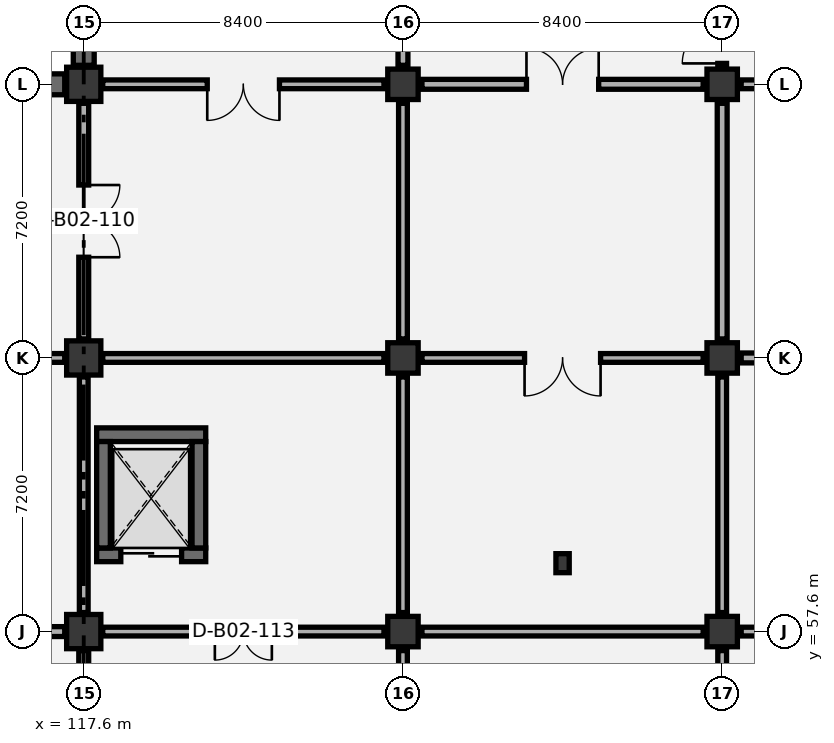
"""IFC4 building model, lengths in metres.
Left out: names, types, materials, properties, quantities, classifications, styles, units other than length and angle.
Written with IfcOpenShell. Run it as: python <this file> out.ifc"""

import sys

from ifc_helpers import new_model, si_unit, direction, frame, frame_2d, origin, origin_2d, place, context, subcontext, project, spatial, rectangle, extrude, element, fill, save


model = new_model("IFC4")
c1 = context("Model", 3, precision=1e-05, world=origin(), true_north=direction((0.0, 1.0)))
c2 = subcontext(c1, "Body", "Model", "MODEL_VIEW")
j1 = project(units=[si_unit("LENGTHUNIT", "METRE"), si_unit("PLANEANGLEUNIT", "RADIAN")], contexts=[c1])
p1 = place(None, origin())
s1 = spatial("IfcSite", under=j1, at=p1, CompositionType="ELEMENT")
p2 = place(p1, origin())
s2 = spatial("IfcBuilding", under=s1, at=p2, CompositionType="ELEMENT")
p3 = place(p2, frame((0.0, 0.0, -9.6)))
s3 = spatial("IfcBuildingStorey", under=s2, at=p3, CompositionType="ELEMENT", Elevation=-9.6)
for number, where, z_axis, x_axis in (
    (1, (117.6, 57.6, 0.0), (0.0, 0.0, 1.0), (1.0, 0.0, 0.0)),
    (2, (117.6, 64.8, 0.0), (0.0, 0.0, 1.0), (1.0, 0.0, 0.0)),
    (3, (117.6, 72.0, 0.0), (0.0, 0.0, 1.0), (1.0, 0.0, 0.0)),
):
    element("IfcColumn", number, at=place(p3, frame(where, z_axis=z_axis, x_axis=x_axis)), inside=s3, PredefinedType="COLUMN", context=c2, shape_type="SweptSolid", body=[
        extrude(rectangle(XDim=0.9, YDim=0.9, at=origin_2d()), origin(), (0.0, 0.0, 1.0), 4.8),
    ])
for number, where, z_axis, x_axis in (
    (4, (126.0, 57.6, 0.0), (0.0, 0.0, 1.0), (1.0, 0.0, 0.0)),
    (5, (126.0, 64.8, 0.0), (0.0, 0.0, 1.0), (1.0, 0.0, 0.0)),
    (6, (126.0, 72.0, 0.0), (0.0, 0.0, 1.0), (1.0, 0.0, 0.0)),
    (7, (134.4, 57.6, 0.0), (0.0, 0.0, 1.0), (1.0, 0.0, 0.0)),
    (8, (134.4, 64.8, 0.0), (0.0, 0.0, 1.0), (1.0, 0.0, 0.0)),
    (9, (134.4, 72.0, 0.0), (0.0, 0.0, 1.0), (1.0, 0.0, 0.0)),
):
    element("IfcColumn", number, at=place(p3, frame(where, z_axis=z_axis, x_axis=x_axis)), inside=s3, PredefinedType="COLUMN", context=c2, shape_type="SweptSolid", body=[
        extrude(rectangle(XDim=0.8, YDim=0.8, at=origin_2d()), origin(), (0.0, 0.0, 1.0), 4.8),
    ])
p4 = place(p3, frame((130.2, 59.4, 0.0), z_axis=(0.0, 0.0, 1.0), x_axis=(1.0, 0.0, 0.0)))
e10 = element("IfcColumn", 10, at=p4, inside=s3, PredefinedType="PILASTER", context=c2, shape_type="SweptSolid", body=[
    extrude(rectangle(XDim=0.35, YDim=0.5, at=origin_2d()), origin(), (0.0, 0.0, 1.0), 4.8),
])
p5 = place(p3, frame((109.7, 72.0, 0.0), z_axis=(0.0, 0.0, 1.0), x_axis=(1.0, 0.0, 0.0)))
e11 = element("IfcWall", 11, at=p5, inside=s3, PredefinedType="USERDEFINED", context=c2, shape_type="SweptSolid", body=[
    extrude(rectangle(XDim=7.4, YDim=0.55, at=frame_2d((3.7, 0.0))), origin(), (0.0, 0.0, 1.0), 4.4),
])
p6 = place(p3, frame((117.6, 72.5, 0.0), z_axis=(0.0, 0.0, 1.0), x_axis=(0.0, 1.0, 0.0)))
e12 = element("IfcWall", 12, at=p6, inside=s3, PredefinedType="USERDEFINED", context=c2, shape_type="SweptSolid", body=[
    extrude(rectangle(XDim=6.2, YDim=0.55, at=frame_2d((3.1, 0.0))), origin(), (0.0, 0.0, 1.0), 4.4),
])
p7 = place(p3, frame((117.94, 62.78, -0.75), z_axis=(0.0, 0.0, 1.0), x_axis=(1.0, 0.0, 0.0)))
e13 = element("IfcWall", 13, at=p7, inside=s3, PredefinedType="SHEAR", context=c2, shape_type="SweptSolid", body=[
    extrude(rectangle(XDim=2.87, YDim=0.36, at=frame_2d((1.435, 0.0))), origin(), (0.0, 0.0, 1.0), 5.15),
])
p8 = place(p3, frame((117.94, 59.62, -0.75), z_axis=(0.0, 0.0, 1.0), x_axis=(1.0, 0.0, 0.0)))
e14 = element("IfcWall", 14, at=p8, inside=s3, PredefinedType="SHEAR", context=c2, shape_type="SweptSolid", body=[
    extrude(rectangle(XDim=2.87, YDim=0.36, at=frame_2d((1.435, 0.0))), origin(), (0.0, 0.0, 1.0), 5.15),
])
p9 = place(p8, frame((0.635, 0.0, 0.75)))
e15 = element("IfcOpeningElement", 15, at=p9, cuts=e14, PredefinedType="OPENING", context=c2, shape_type="SweptSolid", body=[
    extrude(rectangle(XDim=1.6, YDim=2.25, at=frame_2d((0.8, 1.125))), frame((0.0, 0.19, 0.0), z_axis=(0.0, -1.0, 0.0), x_axis=(1.0, 0.0, 0.0)), (0.0, 0.0, 1.0), 0.38),
])
for number, where, z_axis, x_axis in (
    (16, (118.12, 59.8, -0.75), (0.0, 0.0, 1.0), (0.0, 1.0, 0.0)),
    (17, (120.63, 59.8, -0.75), (0.0, 0.0, 1.0), (0.0, 1.0, 0.0)),
):
    element("IfcWall", number, at=place(p3, frame(where, z_axis=z_axis, x_axis=x_axis)), inside=s3, PredefinedType="SHEAR", context=c2, shape_type="SweptSolid", body=[
        extrude(rectangle(XDim=2.8, YDim=0.36, at=frame_2d((1.4, 0.0))), origin(), (0.0, 0.0, 1.0), 5.15),
    ])
p10 = place(p3, frame((117.6, 50.9, 0.0), z_axis=(0.0, 0.0, 1.0), x_axis=(0.0, 1.0, 0.0)))
e18 = element("IfcWall", 18, at=p10, inside=s3, PredefinedType="PARTITIONING", context=c2, shape_type="SweptSolid", body=[
    extrude(rectangle(XDim=6.2, YDim=0.26, at=frame_2d((3.1, 0.0))), origin(), (0.0, 0.0, 1.0), 3.595),
])
p11 = place(p3, frame((109.7, 57.6, 0.0), z_axis=(0.0, 0.0, 1.0), x_axis=(1.0, 0.0, 0.0)))
e19 = element("IfcWall", 19, at=p11, inside=s3, PredefinedType="PARTITIONING", context=c2, shape_type="SweptSolid", body=[
    extrude(rectangle(XDim=7.4, YDim=0.26, at=frame_2d((3.7, 0.0))), origin(), (0.0, 0.0, 1.0), 3.495),
])
p12 = place(p11, frame((2.7, 0.0, 0.0)))
e20 = element("IfcOpeningElement", 20, at=p12, cuts=e19, PredefinedType="OPENING", context=c2, shape_type="SweptSolid", body=[
    extrude(rectangle(XDim=2.0, YDim=2.35, at=frame_2d((1.0, 1.175))), frame((0.0, 0.14, 0.0), z_axis=(0.0, -1.0, 0.0), x_axis=(1.0, 0.0, 0.0)), (0.0, 0.0, 1.0), 0.28),
])
p13 = place(p3, frame((117.6, 58.1, 0.0), z_axis=(0.0, 0.0, 1.0), x_axis=(0.0, 1.0, 0.0)))
e21 = element("IfcWall", 21, at=p13, inside=s3, PredefinedType="PARTITIONING", context=c2, shape_type="SweptSolid", body=[
    extrude(rectangle(XDim=6.2, YDim=0.23, at=frame_2d((3.1, 0.0))), origin(), (0.0, 0.0, 1.0), 3.595),
])
p14 = place(p3, frame((109.7, 64.8, 0.0), z_axis=(0.0, 0.0, 1.0), x_axis=(1.0, 0.0, 0.0)))
e22 = element("IfcWall", 22, at=p14, inside=s3, PredefinedType="PARTITIONING", context=c2, shape_type="SweptSolid", body=[
    extrude(rectangle(XDim=7.4, YDim=0.23, at=frame_2d((3.7, 0.0))), origin(), (0.0, 0.0, 1.0), 3.495),
])
p15 = place(p3, frame((117.6, 65.3, 0.0), z_axis=(0.0, 0.0, 1.0), x_axis=(0.0, 1.0, 0.0)))
e23 = element("IfcWall", 23, at=p15, inside=s3, PredefinedType="PARTITIONING", context=c2, shape_type="SweptSolid", body=[
    extrude(rectangle(XDim=6.2, YDim=0.26, at=frame_2d((3.1, 0.0))), origin(), (0.0, 0.0, 1.0), 3.595),
])
p16 = place(p15, frame((2.15, 0.0, 0.0)))
e24 = element("IfcOpeningElement", 24, at=p16, cuts=e23, PredefinedType="OPENING", context=c2, shape_type="SweptSolid", body=[
    extrude(rectangle(XDim=1.9, YDim=2.3, at=frame_2d((0.95, 1.15))), frame((0.0, 0.14, 0.0), z_axis=(0.0, -1.0, 0.0), x_axis=(1.0, 0.0, 0.0)), (0.0, 0.0, 1.0), 0.28),
])
p17 = place(p3, frame((126.0, 50.9, 0.0), z_axis=(0.0, 0.0, 1.0), x_axis=(0.0, 1.0, 0.0)))
e25 = element("IfcWall", 25, at=p17, inside=s3, PredefinedType="PARTITIONING", context=c2, shape_type="SweptSolid", body=[
    extrude(rectangle(XDim=6.2, YDim=0.23, at=frame_2d((3.1, 0.0))), origin(), (0.0, 0.0, 1.0), 3.595),
])
p18 = place(p17, frame((0.05, 0.0, 0.0)))
e26 = element("IfcOpeningElement", 26, at=p18, cuts=e25, PredefinedType="OPENING", context=c2, shape_type="SweptSolid", body=[
    extrude(rectangle(XDim=1.05, YDim=2.15, at=frame_2d((0.525, 1.075))), frame((0.0, 0.125, 0.0), z_axis=(0.0, -1.0, 0.0), x_axis=(1.0, 0.0, 0.0)), (0.0, 0.0, 1.0), 0.25),
])
p19 = place(p3, frame((118.1, 57.6, 0.0), z_axis=(0.0, 0.0, 1.0), x_axis=(1.0, 0.0, 0.0)))
e27 = element("IfcWall", 27, at=p19, inside=s3, PredefinedType="PARTITIONING", context=c2, shape_type="SweptSolid", body=[
    extrude(rectangle(XDim=7.4, YDim=0.23, at=frame_2d((3.7, 0.0))), origin(), (0.0, 0.0, 1.0), 3.495),
])
p20 = place(p19, frame((2.95, 0.0, 0.0)))
e28 = element("IfcOpeningElement", 28, at=p20, cuts=e27, PredefinedType="OPENING", context=c2, shape_type="SweptSolid", body=[
    extrude(rectangle(XDim=1.5, YDim=2.15, at=frame_2d((0.75, 1.075))), frame((0.0, 0.125, 0.0), z_axis=(0.0, -1.0, 0.0), x_axis=(1.0, 0.0, 0.0)), (0.0, 0.0, 1.0), 0.25),
])
p21 = place(p3, frame((126.0, 58.1, 0.0), z_axis=(0.0, 0.0, 1.0), x_axis=(0.0, 1.0, 0.0)))
e29 = element("IfcWall", 29, at=p21, inside=s3, PredefinedType="PARTITIONING", context=c2, shape_type="SweptSolid", body=[
    extrude(rectangle(XDim=6.2, YDim=0.23, at=frame_2d((3.1, 0.0))), origin(), (0.0, 0.0, 1.0), 3.595),
])
p22 = place(p3, frame((118.1, 64.8, 0.0), z_axis=(0.0, 0.0, 1.0), x_axis=(1.0, 0.0, 0.0)))
e30 = element("IfcWall", 30, at=p22, inside=s3, PredefinedType="PARTITIONING", context=c2, shape_type="SweptSolid", body=[
    extrude(rectangle(XDim=7.4, YDim=0.23, at=frame_2d((3.7, 0.0))), origin(), (0.0, 0.0, 1.0), 3.495),
])
p23 = place(p3, frame((126.0, 65.3, 0.0), z_axis=(0.0, 0.0, 1.0), x_axis=(0.0, 1.0, 0.0)))
e31 = element("IfcWall", 31, at=p23, inside=s3, PredefinedType="PARTITIONING", context=c2, shape_type="SweptSolid", body=[
    extrude(rectangle(XDim=6.2, YDim=0.23, at=frame_2d((3.1, 0.0))), origin(), (0.0, 0.0, 1.0), 3.595),
])
p24 = place(p3, frame((118.1, 72.0, 0.0), z_axis=(0.0, 0.0, 1.0), x_axis=(1.0, 0.0, 0.0)))
e32 = element("IfcWall", 32, at=p24, inside=s3, PredefinedType="PARTITIONING", context=c2, shape_type="SweptSolid", body=[
    extrude(rectangle(XDim=7.4, YDim=0.23, at=frame_2d((3.7, 0.0))), origin(), (0.0, 0.0, 1.0), 3.495),
])
p25 = place(p24, frame((2.75, 0.0, 0.0)))
e33 = element("IfcOpeningElement", 33, at=p25, cuts=e32, PredefinedType="OPENING", context=c2, shape_type="SweptSolid", body=[
    extrude(rectangle(XDim=1.9, YDim=2.3, at=frame_2d((0.95, 1.15))), frame((0.0, 0.125, 0.0), z_axis=(0.0, -1.0, 0.0), x_axis=(1.0, 0.0, 0.0)), (0.0, 0.0, 1.0), 0.25),
])
p26 = place(p3, frame((126.0, 72.5, 0.0), z_axis=(0.0, 0.0, 1.0), x_axis=(0.0, 1.0, 0.0)))
e34 = element("IfcWall", 34, at=p26, inside=s3, PredefinedType="PARTITIONING", context=c2, shape_type="SweptSolid", body=[
    extrude(rectangle(XDim=6.2, YDim=0.26, at=frame_2d((3.1, 0.0))), origin(), (0.0, 0.0, 1.0), 3.595),
])
p27 = place(p26, frame((2.1, 0.0, 0.0)))
e35 = element("IfcOpeningElement", 35, at=p27, cuts=e34, PredefinedType="OPENING", context=c2, shape_type="SweptSolid", body=[
    extrude(rectangle(XDim=2.0, YDim=2.35, at=frame_2d((1.0, 1.175))), frame((0.0, 0.14, 0.0), z_axis=(0.0, -1.0, 0.0), x_axis=(1.0, 0.0, 0.0)), (0.0, 0.0, 1.0), 0.28),
])
p28 = place(p3, frame((134.4, 50.9, 0.0), z_axis=(0.0, 0.0, 1.0), x_axis=(0.0, 1.0, 0.0)))
e36 = element("IfcWall", 36, at=p28, inside=s3, PredefinedType="PARTITIONING", context=c2, shape_type="SweptSolid", body=[
    extrude(rectangle(XDim=6.2, YDim=0.23, at=frame_2d((3.1, 0.0))), origin(), (0.0, 0.0, 1.0), 3.595),
])
p29 = place(p3, frame((126.5, 57.6, 0.0), z_axis=(0.0, 0.0, 1.0), x_axis=(1.0, 0.0, 0.0)))
e37 = element("IfcWall", 37, at=p29, inside=s3, PredefinedType="PARTITIONING", context=c2, shape_type="SweptSolid", body=[
    extrude(rectangle(XDim=7.4, YDim=0.23, at=frame_2d((3.7, 0.0))), origin(), (0.0, 0.0, 1.0), 3.495),
])
p30 = place(p3, frame((134.4, 58.1, 0.0), z_axis=(0.0, 0.0, 1.0), x_axis=(0.0, 1.0, 0.0)))
e38 = element("IfcWall", 38, at=p30, inside=s3, PredefinedType="PARTITIONING", context=c2, shape_type="SweptSolid", body=[
    extrude(rectangle(XDim=6.2, YDim=0.23, at=frame_2d((3.1, 0.0))), origin(), (0.0, 0.0, 1.0), 3.595),
])
p31 = place(p3, frame((126.5, 64.8, 0.0), z_axis=(0.0, 0.0, 1.0), x_axis=(1.0, 0.0, 0.0)))
e39 = element("IfcWall", 39, at=p31, inside=s3, PredefinedType="PARTITIONING", context=c2, shape_type="SweptSolid", body=[
    extrude(rectangle(XDim=7.4, YDim=0.23, at=frame_2d((3.7, 0.0))), origin(), (0.0, 0.0, 1.0), 3.495),
])
p32 = place(p31, frame((2.7, 0.0, 0.0)))
e40 = element("IfcOpeningElement", 40, at=p32, cuts=e39, PredefinedType="OPENING", context=c2, shape_type="SweptSolid", body=[
    extrude(rectangle(XDim=2.0, YDim=2.35, at=frame_2d((1.0, 1.175))), frame((0.0, 0.125, 0.0), z_axis=(0.0, -1.0, 0.0), x_axis=(1.0, 0.0, 0.0)), (0.0, 0.0, 1.0), 0.25),
])
p33 = place(p3, frame((134.4, 65.3, 0.0), z_axis=(0.0, 0.0, 1.0), x_axis=(0.0, 1.0, 0.0)))
e41 = element("IfcWall", 41, at=p33, inside=s3, PredefinedType="PARTITIONING", context=c2, shape_type="SweptSolid", body=[
    extrude(rectangle(XDim=6.2, YDim=0.26, at=frame_2d((3.1, 0.0))), origin(), (0.0, 0.0, 1.0), 3.595),
])
p34 = place(p3, frame((126.5, 72.0, 0.0), z_axis=(0.0, 0.0, 1.0), x_axis=(1.0, 0.0, 0.0)))
e42 = element("IfcWall", 42, at=p34, inside=s3, PredefinedType="PARTITIONING", context=c2, shape_type="SweptSolid", body=[
    extrude(rectangle(XDim=7.4, YDim=0.26, at=frame_2d((3.7, 0.0))), origin(), (0.0, 0.0, 1.0), 3.495),
])
p35 = place(p34, frame((2.75, 0.0, 0.0)))
e43 = element("IfcOpeningElement", 43, at=p35, cuts=e42, PredefinedType="OPENING", context=c2, shape_type="SweptSolid", body=[
    extrude(rectangle(XDim=1.9, YDim=2.3, at=frame_2d((0.95, 1.15))), frame((0.0, 0.14, 0.0), z_axis=(0.0, -1.0, 0.0), x_axis=(1.0, 0.0, 0.0)), (0.0, 0.0, 1.0), 0.28),
])
p36 = place(p3, frame((134.4, 72.5, 0.0), z_axis=(0.0, 0.0, 1.0), x_axis=(0.0, 1.0, 0.0)))
e44 = element("IfcWall", 44, at=p36, inside=s3, PredefinedType="PARTITIONING", context=c2, shape_type="SweptSolid", body=[
    extrude(rectangle(XDim=6.2, YDim=0.23, at=frame_2d((3.1, 0.0))), origin(), (0.0, 0.0, 1.0), 3.595),
])
p37 = place(p36, frame((0.05, 0.0, 0.0)))
e45 = element("IfcOpeningElement", 45, at=p37, cuts=e44, PredefinedType="OPENING", context=c2, shape_type="SweptSolid", body=[
    extrude(rectangle(XDim=1.05, YDim=2.15, at=frame_2d((0.525, 1.075))), frame((0.0, 0.125, 0.0), z_axis=(0.0, -1.0, 0.0), x_axis=(1.0, 0.0, 0.0)), (0.0, 0.0, 1.0), 0.25),
])
p38 = place(p3, frame((134.9, 57.6, 0.0), z_axis=(0.0, 0.0, 1.0), x_axis=(1.0, 0.0, 0.0)))
e46 = element("IfcWall", 46, at=p38, inside=s3, PredefinedType="PARTITIONING", context=c2, shape_type="SweptSolid", body=[
    extrude(rectangle(XDim=7.4, YDim=0.23, at=frame_2d((3.7, 0.0))), origin(), (0.0, 0.0, 1.0), 3.495),
])
p39 = place(p38, frame((2.7, 0.0, 0.0)))
e47 = element("IfcOpeningElement", 47, at=p39, cuts=e46, PredefinedType="OPENING", context=c2, shape_type="SweptSolid", body=[
    extrude(rectangle(XDim=2.0, YDim=2.35, at=frame_2d((1.0, 1.175))), frame((0.0, 0.125, 0.0), z_axis=(0.0, -1.0, 0.0), x_axis=(1.0, 0.0, 0.0)), (0.0, 0.0, 1.0), 0.25),
])
p40 = place(p3, frame((134.9, 64.8, 0.0), z_axis=(0.0, 0.0, 1.0), x_axis=(1.0, 0.0, 0.0)))
e48 = element("IfcWall", 48, at=p40, inside=s3, PredefinedType="PARTITIONING", context=c2, shape_type="SweptSolid", body=[
    extrude(rectangle(XDim=7.4, YDim=0.26, at=frame_2d((3.7, 0.0))), origin(), (0.0, 0.0, 1.0), 3.495),
])
p41 = place(p40, frame((2.75, 0.0, 0.0)))
e49 = element("IfcOpeningElement", 49, at=p41, cuts=e48, PredefinedType="OPENING", context=c2, shape_type="SweptSolid", body=[
    extrude(rectangle(XDim=1.9, YDim=2.3, at=frame_2d((0.95, 1.15))), frame((0.0, 0.14, 0.0), z_axis=(0.0, -1.0, 0.0), x_axis=(1.0, 0.0, 0.0)), (0.0, 0.0, 1.0), 0.28),
])
p42 = place(p3, frame((134.9, 72.0, 0.0), z_axis=(0.0, 0.0, 1.0), x_axis=(1.0, 0.0, 0.0)))
e50 = element("IfcWall", 50, at=p42, inside=s3, PredefinedType="PARTITIONING", context=c2, shape_type="SweptSolid", body=[
    extrude(rectangle(XDim=7.4, YDim=0.23, at=frame_2d((3.7, 0.0))), origin(), (0.0, 0.0, 1.0), 3.495),
])
p43 = place(p42, frame((2.95, 0.0, 0.0)))
e51 = element("IfcOpeningElement", 51, at=p43, cuts=e50, PredefinedType="OPENING", context=c2, shape_type="SweptSolid", body=[
    extrude(rectangle(XDim=1.5, YDim=2.15, at=frame_2d((0.75, 1.075))), frame((0.0, 0.125, 0.0), z_axis=(0.0, -1.0, 0.0), x_axis=(1.0, 0.0, 0.0)), (0.0, 0.0, 1.0), 0.25),
])
p44 = place(p9, origin())
e52 = element("IfcDoor", 52, at=p44, inside=s3, OperationType="DOUBLE_DOOR_SLIDING", PredefinedType="DOOR", context=c2, shape_type="SweptSolid", body=[
    extrude(rectangle(XDim=1.6, YDim=2.25, at=frame_2d((0.8, 1.125))), frame((0.0, 0.025, 0.0), z_axis=(0.0, -1.0, 0.0), x_axis=(1.0, 0.0, 0.0)), (0.0, 0.0, 1.0), 0.05),
])
fill(e15, e52)
p45 = place(p16, frame((1.9, 0.0, 0.0), z_axis=(0.0, 0.0, 1.0), x_axis=(-1.0, 0.0, 0.0)))
e53 = element("IfcDoor", 53, at=p45, inside=s3, OperationType="DOUBLE_DOOR_SINGLE_SWING", PredefinedType="DOOR", context=c2, shape_type="SweptSolid", body=[
    extrude(rectangle(XDim=1.9, YDim=2.3, at=frame_2d((0.95, 1.15))), frame((0.0, 0.025, 0.0), z_axis=(0.0, -1.0, 0.0), x_axis=(1.0, 0.0, 0.0)), (0.0, 0.0, 1.0), 0.05),
])
fill(e24, e53)
p46 = place(p20, frame((1.5, 0.0, 0.0), z_axis=(0.0, 0.0, 1.0), x_axis=(-1.0, 0.0, 0.0)))
e54 = element("IfcDoor", 54, at=p46, inside=s3, OperationType="DOUBLE_DOOR_SINGLE_SWING", PredefinedType="DOOR", context=c2, shape_type="SweptSolid", body=[
    extrude(rectangle(XDim=1.5, YDim=2.15, at=frame_2d((0.75, 1.075))), frame((0.0, 0.025, 0.0), z_axis=(0.0, -1.0, 0.0), x_axis=(1.0, 0.0, 0.0)), (0.0, 0.0, 1.0), 0.05),
])
fill(e28, e54)
p47 = place(p25, frame((1.9, 0.0, 0.0), z_axis=(0.0, 0.0, 1.0), x_axis=(-1.0, 0.0, 0.0)))
e55 = element("IfcDoor", 55, at=p47, inside=s3, OperationType="DOUBLE_DOOR_SINGLE_SWING", PredefinedType="DOOR", context=c2, shape_type="SweptSolid", body=[
    extrude(rectangle(XDim=1.9, YDim=2.3, at=frame_2d((0.95, 1.15))), frame((0.0, 0.025, 0.0), z_axis=(0.0, -1.0, 0.0), x_axis=(1.0, 0.0, 0.0)), (0.0, 0.0, 1.0), 0.05),
])
fill(e33, e55)
p48 = place(p32, frame((2.0, 0.0, 0.0), z_axis=(0.0, 0.0, 1.0), x_axis=(-1.0, 0.0, 0.0)))
e56 = element("IfcDoor", 56, at=p48, inside=s3, OperationType="DOUBLE_DOOR_SINGLE_SWING", PredefinedType="DOOR", context=c2, shape_type="SweptSolid", body=[
    extrude(rectangle(XDim=2.0, YDim=2.35, at=frame_2d((1.0, 1.175))), frame((0.0, 0.025, 0.0), z_axis=(0.0, -1.0, 0.0), x_axis=(1.0, 0.0, 0.0)), (0.0, 0.0, 1.0), 0.05),
])
fill(e40, e56)
p49 = place(p35, origin())
e57 = element("IfcDoor", 57, at=p49, inside=s3, OperationType="DOUBLE_DOOR_SINGLE_SWING", PredefinedType="DOOR", context=c2, shape_type="SweptSolid", body=[
    extrude(rectangle(XDim=1.9, YDim=2.3, at=frame_2d((0.95, 1.15))), frame((0.0, 0.025, 0.0), z_axis=(0.0, -1.0, 0.0), x_axis=(1.0, 0.0, 0.0)), (0.0, 0.0, 1.0), 0.05),
])
fill(e43, e57)
p50 = place(p37, origin())
e58 = element("IfcDoor", 58, at=p50, inside=s3, OperationType="SINGLE_SWING_LEFT", PredefinedType="DOOR", context=c2, shape_type="SweptSolid", body=[
    extrude(rectangle(XDim=1.05, YDim=2.15, at=frame_2d((0.525, 1.075))), frame((0.0, 0.025, 0.0), z_axis=(0.0, -1.0, 0.0), x_axis=(1.0, 0.0, 0.0)), (0.0, 0.0, 1.0), 0.05),
])
fill(e45, e58)
save(model, sys.argv[1])
